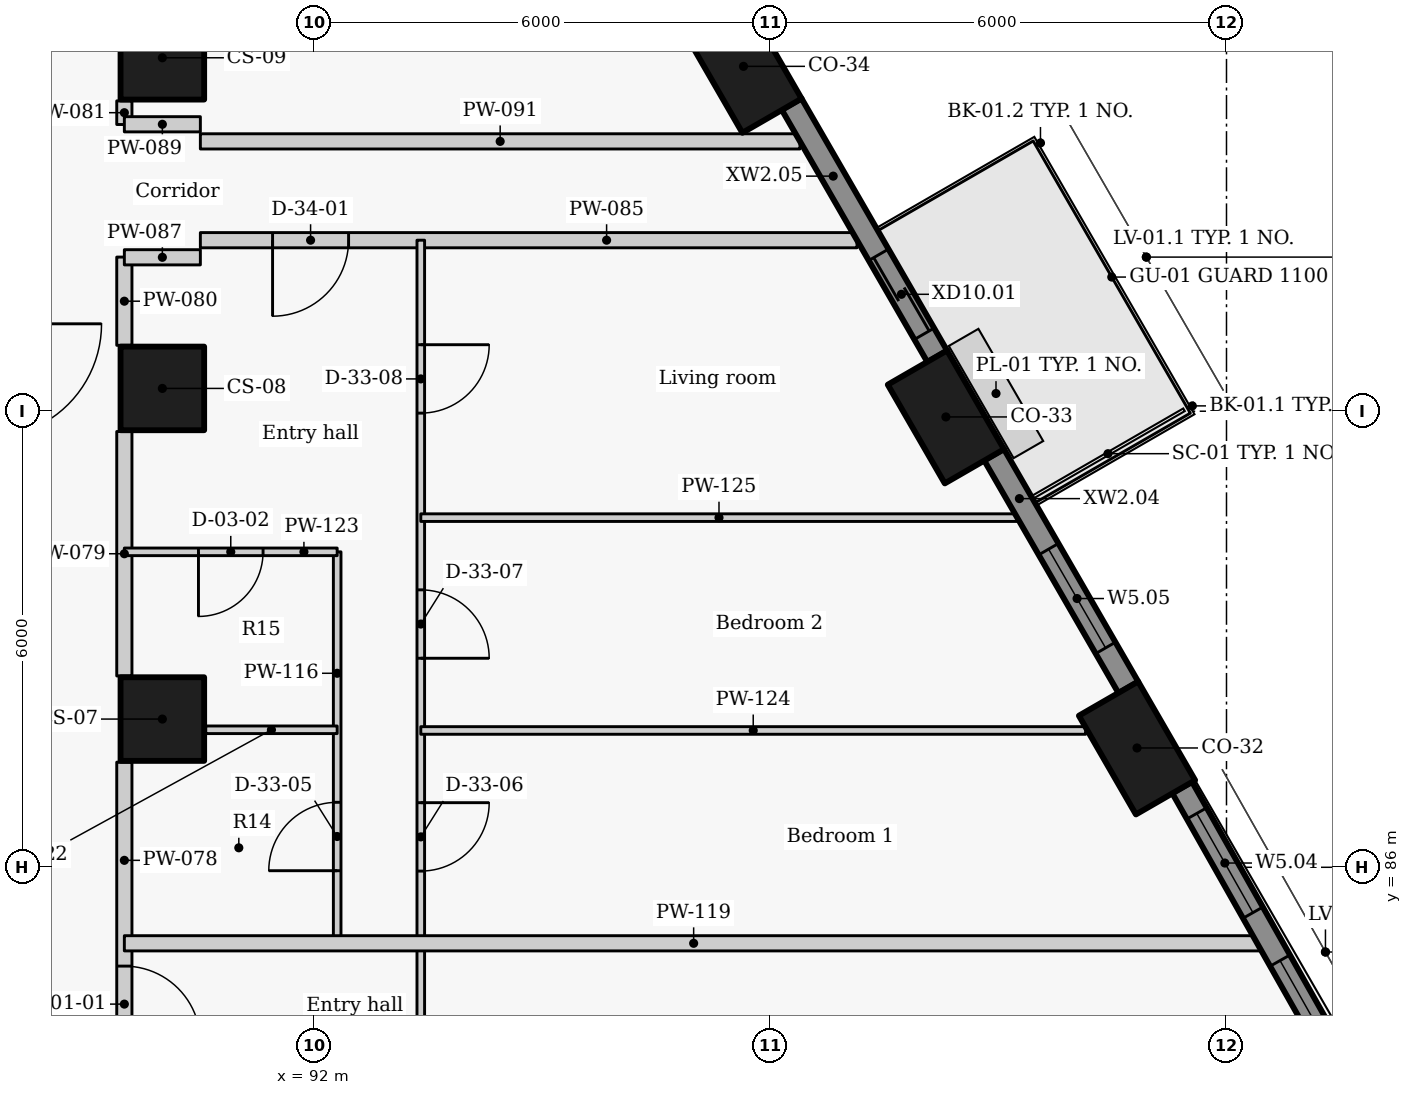
"""IFC4 building model, lengths in metres.
Left out: names, types, materials, properties, quantities, classifications, styles, units other than length and angle.
Written with IfcOpenShell. Run it as: python <this file> out.ifc"""

import sys

from ifc_helpers import new_model, si_unit, direction, frame, frame_2d, origin, origin_2d, place, context, subcontext, project, spatial, rectangle, extrude, element, fill, save


model = new_model("IFC4")
c1 = context("Model", 3, precision=1e-05, world=origin(), true_north=direction((0.0, 1.0)))
c2 = subcontext(c1, "Body", "Model", "MODEL_VIEW")
j1 = project(units=[si_unit("LENGTHUNIT", "METRE"), si_unit("PLANEANGLEUNIT", "RADIAN")], contexts=[c1])
p1 = place(None, origin())
s1 = spatial("IfcSite", under=j1, at=p1, CompositionType="ELEMENT")
p2 = place(p1, origin())
s2 = spatial("IfcBuilding", under=s1, at=p2, CompositionType="ELEMENT")
p3 = place(p2, frame((0.0, 0.0, 67.8)))
s3 = spatial("IfcBuildingStorey", under=s2, at=p3, CompositionType="ELEMENT", Elevation=67.8)
for number, where, z_axis, x_axis in (
    (1, (102.823, 87.57, 0.0), (0.0, 0.0, 1.0), (-0.5, 0.866, 0.0)),
    (2, (100.308, 91.925, 0.0), (0.0, 0.0, 1.0), (-0.5, 0.866, 0.0)),
    (3, (97.646, 96.537, 0.0), (0.0, 0.0, 1.0), (-0.5, 0.866, 0.0)),
):
    element("IfcColumn", number, at=place(p3, frame(where, z_axis=z_axis, x_axis=x_axis)), inside=s3, PredefinedType="COLUMN", context=c2, shape_type="SweptSolid", body=[
        extrude(rectangle(XDim=1.5, YDim=0.9, at=origin_2d()), origin(), (0.0, 0.0, 1.0), 3.3),
    ])
for number, where, z_axis, x_axis in (
    (4, (90.0, 87.95, 0.0), (0.0, 0.0, 1.0), (0.0, 1.0, 0.0)),
    (5, (90.0, 92.3, 0.0), (0.0, 0.0, 1.0), (0.0, 1.0, 0.0)),
    (6, (90.0, 96.65, 0.0), (0.0, 0.0, 1.0), (0.0, 1.0, 0.0)),
):
    element("IfcColumn", number, at=place(p3, frame(where, z_axis=z_axis, x_axis=x_axis)), inside=s3, PredefinedType="COLUMN", context=c2, shape_type="SweptSolid", body=[
        extrude(rectangle(XDim=1.1, YDim=1.1, at=origin_2d()), origin(), (0.0, 0.0, 1.0), 3.3),
    ])
p4 = place(p3, frame((106.186, 82.153, 0.0), z_axis=(0.0, 0.0, 1.0), x_axis=(-0.492363204642, 0.870389840655, 0.0)))
e7 = element("IfcWall", 7, at=p4, inside=s3, PredefinedType="SOLIDWALL", context=c2, shape_type="SweptSolid", body=[
    extrude(rectangle(XDim=5.626, YDim=0.3, at=frame_2d((2.813, 0.0))), origin(), (0.0, 0.0, 1.0), 2.05),
])
p5 = place(p4, frame((0.909, 0.0, 0.9)))
e8 = element("IfcOpeningElement", 8, at=p5, cuts=e7, PredefinedType="OPENING", context=c2, shape_type="SweptSolid", body=[
    extrude(rectangle(XDim=2.1, YDim=1.1, at=frame_2d((1.05, 0.55))), frame((0.0, 0.16, 0.0), z_axis=(0.0, -1.0, 0.0), x_axis=(1.0, 0.0, 0.0)), (0.0, 0.0, 1.0), 0.32),
])
p6 = place(p4, frame((3.734, 0.0, 0.9)))
e9 = element("IfcOpeningElement", 9, at=p6, cuts=e7, PredefinedType="OPENING", context=c2, shape_type="SweptSolid", body=[
    extrude(rectangle(XDim=1.5, YDim=1.1, at=frame_2d((0.75, 0.55))), frame((0.0, 0.16, 0.0), z_axis=(0.0, -1.0, 0.0), x_axis=(1.0, 0.0, 0.0)), (0.0, 0.0, 1.0), 0.32),
])
p7 = place(p3, frame((102.71, 88.366, 0.0), z_axis=(0.0, 0.0, 1.0), x_axis=(-0.499977402622, 0.866038449993, 0.0)))
e10 = element("IfcWall", 10, at=p7, inside=s3, PredefinedType="SOLIDWALL", context=c2, shape_type="SweptSolid", body=[
    extrude(rectangle(XDim=3.537, YDim=0.3, at=frame_2d((1.769, 0.0))), origin(), (0.0, 0.0, 1.0), 2.05),
])
p8 = place(p7, frame((0.601, 0.0, 0.9)))
e11 = element("IfcOpeningElement", 11, at=p8, cuts=e10, PredefinedType="OPENING", context=c2, shape_type="SweptSolid", body=[
    extrude(rectangle(XDim=1.5, YDim=1.1, at=frame_2d((0.75, 0.55))), frame((0.0, 0.16, 0.0), z_axis=(0.0, -1.0, 0.0), x_axis=(1.0, 0.0, 0.0)), (0.0, 0.0, 1.0), 0.32),
])
p9 = place(p3, frame((100.195, 92.721, 0.0), z_axis=(0.0, 0.0, 1.0), x_axis=(-0.500001735503, 0.866024401789, 0.0)))
e12 = element("IfcWall", 12, at=p9, inside=s3, PredefinedType="SOLIDWALL", context=c2, shape_type="SweptSolid", body=[
    extrude(rectangle(XDim=3.834, YDim=0.3, at=frame_2d((1.917, 0.0))), origin(), (0.0, 0.0, 1.0), 2.05),
])
p10 = place(p9, frame((0.344, 0.0, 0.0)))
e13 = element("IfcOpeningElement", 13, at=p10, cuts=e12, PredefinedType="OPENING", context=c2, shape_type="SweptSolid", body=[
    extrude(rectangle(XDim=1.2, YDim=2.0, at=frame_2d((0.6, 1.0))), frame((0.0, 0.16, 0.0), z_axis=(0.0, -1.0, 0.0), x_axis=(1.0, 0.0, 0.0)), (0.0, 0.0, 1.0), 0.32),
])
p11 = place(p3, frame((89.5, 87.383, 0.0), z_axis=(0.0, 0.0, 1.0), x_axis=(0.0, -1.0, 0.0)))
e14 = element("IfcWall", 14, at=p11, inside=s3, PredefinedType="PARTITIONING", context=c2, shape_type="SweptSolid", body=[
    extrude(rectangle(XDim=3.986, YDim=0.2, at=frame_2d((1.993, 0.0))), origin(), (0.0, 0.0, 1.0), 2.95),
])
p12 = place(p11, frame((2.683, 0.0, 0.0)))
e15 = element("IfcOpeningElement", 15, at=p12, cuts=e14, PredefinedType="OPENING", context=c2, shape_type="SweptSolid", body=[
    extrude(rectangle(XDim=1.0, YDim=2.1, at=frame_2d((0.5, 1.05))), frame((0.0, 0.11, 0.0), z_axis=(0.0, -1.0, 0.0), x_axis=(1.0, 0.0, 0.0)), (0.0, 0.0, 1.0), 0.22),
])
p13 = place(p3, frame((89.5, 88.517, 0.0), z_axis=(0.0, 0.0, 1.0), x_axis=(0.0, 1.0, 0.0)))
e16 = element("IfcWall", 16, at=p13, inside=s3, PredefinedType="PARTITIONING", context=c2, shape_type="SweptSolid", body=[
    extrude(rectangle(XDim=3.216, YDim=0.2, at=frame_2d((1.608, 0.0))), origin(), (0.0, 0.0, 1.0), 2.95),
])
p14 = place(p3, frame((89.5, 92.867, 0.0), z_axis=(0.0, 0.0, 1.0), x_axis=(0.0, 1.0, 0.0)))
e17 = element("IfcWall", 17, at=p14, inside=s3, PredefinedType="PARTITIONING", context=c2, shape_type="SweptSolid", body=[
    extrude(rectangle(XDim=1.161, YDim=0.2, at=frame_2d((0.581, 0.0))), origin(), (0.0, 0.0, 1.0), 2.95),
])
p15 = place(p3, frame((89.5, 95.772, 0.0), z_axis=(0.0, 0.0, 1.0), x_axis=(0.0, 1.0, 0.0)))
e18 = element("IfcWall", 18, at=p15, inside=s3, PredefinedType="PARTITIONING", context=c2, shape_type="SweptSolid", body=[
    extrude(rectangle(XDim=0.311, YDim=0.2, at=frame_2d((0.156, 0.0))), origin(), (0.0, 0.0, 1.0), 2.95),
])
p16 = place(p3, frame((99.139, 94.25, 0.0), z_axis=(0.0, 0.0, 1.0), x_axis=(-1.0, 0.0, 0.0)))
e19 = element("IfcWall", 19, at=p16, inside=s3, PredefinedType="PARTITIONING", context=c2, shape_type="SweptSolid", body=[
    extrude(rectangle(XDim=8.639, YDim=0.2, at=frame_2d((4.32, 0.0))), origin(), (0.0, 0.0, 1.0), 2.03),
])
p17 = place(p16, frame((6.689, 0.0, 0.0)))
e20 = element("IfcOpeningElement", 20, at=p17, cuts=e19, PredefinedType="OPENING", context=c2, shape_type="SweptSolid", body=[
    extrude(rectangle(XDim=1.0, YDim=2.01, at=frame_2d((0.5, 1.005))), frame((0.0, 0.11, 0.0), z_axis=(0.0, -1.0, 0.0), x_axis=(1.0, 0.0, 0.0)), (0.0, 0.0, 1.0), 0.22),
])
for number, where, z_axis, x_axis in (
    (21, (89.5, 94.025, 0.0), (0.0, 0.0, 1.0), (1.0, 0.0, 0.0)),
    (22, (89.5, 95.775, 0.0), (0.0, 0.0, 1.0), (1.0, 0.0, 0.0)),
):
    element("IfcWall", number, at=place(p3, frame(where, z_axis=z_axis, x_axis=x_axis)), inside=s3, PredefinedType="PARTITIONING", context=c2, shape_type="SweptSolid", body=[
        extrude(rectangle(XDim=1.0, YDim=0.2, at=frame_2d((0.5, 0.0))), origin(), (0.0, 0.0, 1.0), 2.43),
    ])
p18 = place(p3, frame((90.5, 95.55, 0.0), z_axis=(0.0, 0.0, 1.0), x_axis=(1.0, 0.0, 0.0)))
e23 = element("IfcWall", 23, at=p18, inside=s3, PredefinedType="PARTITIONING", context=c2, shape_type="SweptSolid", body=[
    extrude(rectangle(XDim=7.889, YDim=0.2, at=frame_2d((3.944, 0.0))), origin(), (0.0, 0.0, 1.0), 2.03),
])
p19 = place(p3, frame((92.3, 85.0, 0.0), z_axis=(0.0, 0.0, 1.0), x_axis=(0.0, 1.0, 0.0)))
e24 = element("IfcWall", 24, at=p19, inside=s3, PredefinedType="PARTITIONING", context=c2, shape_type="SweptSolid", body=[
    extrude(rectangle(XDim=5.15, YDim=0.1, at=frame_2d((2.575, 0.0))), origin(), (0.0, 0.0, 1.0), 2.95),
])
p20 = place(p19, frame((0.955, 0.0, 0.0)))
e25 = element("IfcOpeningElement", 25, at=p20, cuts=e24, PredefinedType="OPENING", context=c2, shape_type="SweptSolid", body=[
    extrude(rectangle(XDim=0.9, YDim=2.1, at=frame_2d((0.45, 1.05))), frame((0.0, 0.06, 0.0), z_axis=(0.0, -1.0, 0.0), x_axis=(1.0, 0.0, 0.0)), (0.0, 0.0, 1.0), 0.12),
])
p21 = place(p3, frame((93.4, 94.25, 0.0), z_axis=(0.0, 0.0, 1.0), x_axis=(0.0, -1.0, 0.0)))
e26 = element("IfcWall", 26, at=p21, inside=s3, PredefinedType="PARTITIONING", context=c2, shape_type="SweptSolid", body=[
    extrude(rectangle(XDim=19.25, YDim=0.1, at=frame_2d((9.625, 0.0))), origin(), (0.0, 0.0, 1.0), 2.95),
])
p22 = place(p21, frame((17.348, 0.0, 0.0)))
e27 = element("IfcOpeningElement", 27, at=p22, cuts=e26, PredefinedType="OPENING", context=c2, shape_type="SweptSolid", body=[
    extrude(rectangle(XDim=0.9, YDim=2.1, at=frame_2d((0.45, 1.05))), frame((0.0, 0.06, 0.0), z_axis=(0.0, -1.0, 0.0), x_axis=(1.0, 0.0, 0.0)), (0.0, 0.0, 1.0), 0.12),
])
p23 = place(p21, frame((14.445, 0.0, 0.0)))
e28 = element("IfcOpeningElement", 28, at=p23, cuts=e26, PredefinedType="OPENING", context=c2, shape_type="SweptSolid", body=[
    extrude(rectangle(XDim=0.9, YDim=2.1, at=frame_2d((0.45, 1.05))), frame((0.0, 0.06, 0.0), z_axis=(0.0, -1.0, 0.0), x_axis=(1.0, 0.0, 0.0)), (0.0, 0.0, 1.0), 0.12),
])
p24 = place(p21, frame((10.897, 0.0, 0.0)))
e29 = element("IfcOpeningElement", 29, at=p24, cuts=e26, PredefinedType="OPENING", context=c2, shape_type="SweptSolid", body=[
    extrude(rectangle(XDim=0.9, YDim=2.1, at=frame_2d((0.45, 1.05))), frame((0.0, 0.06, 0.0), z_axis=(0.0, -1.0, 0.0), x_axis=(1.0, 0.0, 0.0)), (0.0, 0.0, 1.0), 0.12),
])
p25 = place(p21, frame((7.4, 0.0, 0.0)))
e30 = element("IfcOpeningElement", 30, at=p25, cuts=e26, PredefinedType="OPENING", context=c2, shape_type="SweptSolid", body=[
    extrude(rectangle(XDim=0.9, YDim=2.1, at=frame_2d((0.45, 1.05))), frame((0.0, 0.06, 0.0), z_axis=(0.0, -1.0, 0.0), x_axis=(1.0, 0.0, 0.0)), (0.0, 0.0, 1.0), 0.12),
])
p26 = place(p21, frame((4.6, 0.0, 0.0)))
e31 = element("IfcOpeningElement", 31, at=p26, cuts=e26, PredefinedType="OPENING", context=c2, shape_type="SweptSolid", body=[
    extrude(rectangle(XDim=0.9, YDim=2.1, at=frame_2d((0.45, 1.05))), frame((0.0, 0.06, 0.0), z_axis=(0.0, -1.0, 0.0), x_axis=(1.0, 0.0, 0.0)), (0.0, 0.0, 1.0), 0.12),
])
p27 = place(p21, frame((1.375, 0.0, 0.0)))
e32 = element("IfcOpeningElement", 32, at=p27, cuts=e26, PredefinedType="OPENING", context=c2, shape_type="SweptSolid", body=[
    extrude(rectangle(XDim=0.9, YDim=2.1, at=frame_2d((0.45, 1.05))), frame((0.0, 0.06, 0.0), z_axis=(0.0, -1.0, 0.0), x_axis=(1.0, 0.0, 0.0)), (0.0, 0.0, 1.0), 0.12),
])
p28 = place(p3, frame((89.5, 85.0, 0.0), z_axis=(0.0, 0.0, 1.0), x_axis=(1.0, 0.0, 0.0)))
e33 = element("IfcWall", 33, at=p28, inside=s3, PredefinedType="PARTITIONING", context=c2, shape_type="SweptSolid", body=[
    extrude(rectangle(XDim=14.979, YDim=0.2, at=frame_2d((7.49, 0.0))), origin(), (0.0, 0.0, 1.0), 2.03),
])
p29 = place(p3, frame((90.57, 87.809, 0.0), z_axis=(0.0, 0.0, 1.0), x_axis=(1.0, 0.0, 0.0)))
e34 = element("IfcWall", 34, at=p29, inside=s3, PredefinedType="PARTITIONING", context=c2, shape_type="SweptSolid", body=[
    extrude(rectangle(XDim=1.73, YDim=0.1, at=frame_2d((0.865, 0.0))), origin(), (0.0, 0.0, 1.0), 2.95),
])
p30 = place(p3, frame((92.3, 90.15, 0.0), z_axis=(0.0, 0.0, 1.0), x_axis=(-1.0, 0.0, 0.0)))
e35 = element("IfcWall", 35, at=p30, inside=s3, PredefinedType="PARTITIONING", context=c2, shape_type="SweptSolid", body=[
    extrude(rectangle(XDim=2.8, YDim=0.1, at=frame_2d((1.4, 0.0))), origin(), (0.0, 0.0, 1.0), 2.43),
])
p31 = place(p30, frame((0.975, 0.0, 0.0)))
e36 = element("IfcOpeningElement", 36, at=p31, cuts=e35, PredefinedType="OPENING", context=c2, shape_type="SweptSolid", body=[
    extrude(rectangle(XDim=0.85, YDim=2.1, at=frame_2d((0.425, 1.05))), frame((0.0, 0.06, 0.0), z_axis=(0.0, -1.0, 0.0), x_axis=(1.0, 0.0, 0.0)), (0.0, 0.0, 1.0), 0.12),
])
p32 = place(p3, frame((93.4, 87.8, 0.0), z_axis=(0.0, 0.0, 1.0), x_axis=(1.0, 0.0, 0.0)))
e37 = element("IfcWall", 37, at=p32, inside=s3, PredefinedType="PARTITIONING", context=c2, shape_type="SweptSolid", body=[
    extrude(rectangle(XDim=8.747, YDim=0.1, at=frame_2d((4.374, 0.0))), origin(), (0.0, 0.0, 1.0), 2.95),
])
p33 = place(p3, frame((93.4, 90.6, 0.0), z_axis=(0.0, 0.0, 1.0), x_axis=(1.0, 0.0, 0.0)))
e38 = element("IfcWall", 38, at=p33, inside=s3, PredefinedType="PARTITIONING", context=c2, shape_type="SweptSolid", body=[
    extrude(rectangle(XDim=7.846, YDim=0.1, at=frame_2d((3.923, 0.0))), origin(), (0.0, 0.0, 1.0), 2.03),
])
p34 = place(p5, origin())
e39 = element("IfcWindow", 39, at=p34, inside=s3, PartitioningType="SINGLE_PANEL", PredefinedType="WINDOW", context=c2, shape_type="SweptSolid", body=[
    extrude(rectangle(XDim=2.1, YDim=1.1, at=frame_2d((1.05, 0.55))), frame((0.0, 0.03, 0.0), z_axis=(0.0, -1.0, 0.0), x_axis=(1.0, 0.0, 0.0)), (0.0, 0.0, 1.0), 0.06),
])
fill(e8, e39)
p35 = place(p6, origin())
e40 = element("IfcWindow", 40, at=p35, inside=s3, PartitioningType="SINGLE_PANEL", PredefinedType="WINDOW", context=c2, shape_type="SweptSolid", body=[
    extrude(rectangle(XDim=1.5, YDim=1.1, at=frame_2d((0.75, 0.55))), frame((0.0, 0.03, 0.0), z_axis=(0.0, -1.0, 0.0), x_axis=(1.0, 0.0, 0.0)), (0.0, 0.0, 1.0), 0.06),
])
fill(e9, e40)
p36 = place(p8, origin())
e41 = element("IfcWindow", 41, at=p36, inside=s3, PartitioningType="SINGLE_PANEL", PredefinedType="WINDOW", context=c2, shape_type="SweptSolid", body=[
    extrude(rectangle(XDim=1.5, YDim=1.1, at=frame_2d((0.75, 0.55))), frame((0.0, 0.03, 0.0), z_axis=(0.0, -1.0, 0.0), x_axis=(1.0, 0.0, 0.0)), (0.0, 0.0, 1.0), 0.06),
])
fill(e11, e41)
p37 = place(p10, origin())
e42 = element("IfcDoor", 42, at=p37, inside=s3, OperationType="SLIDING_TO_LEFT", PredefinedType="DOOR", context=c2, shape_type="SweptSolid", body=[
    extrude(rectangle(XDim=1.2, YDim=2.0, at=frame_2d((0.6, 1.0))), frame((0.0, 0.025, 0.0), z_axis=(0.0, -1.0, 0.0), x_axis=(1.0, 0.0, 0.0)), (0.0, 0.0, 1.0), 0.05),
])
fill(e13, e42)
p38 = place(p12, origin())
e43 = element("IfcDoor", 43, at=p38, inside=s3, OperationType="SINGLE_SWING_RIGHT", PredefinedType="DOOR", context=c2, shape_type="SweptSolid", body=[
    extrude(rectangle(XDim=1.0, YDim=2.1, at=frame_2d((0.5, 1.05))), frame((0.0, 0.025, 0.0), z_axis=(0.0, -1.0, 0.0), x_axis=(1.0, 0.0, 0.0)), (0.0, 0.0, 1.0), 0.05),
])
fill(e15, e43)
p39 = place(p17, origin())
e44 = element("IfcDoor", 44, at=p39, inside=s3, OperationType="SINGLE_SWING_RIGHT", PredefinedType="DOOR", context=c2, shape_type="SweptSolid", body=[
    extrude(rectangle(XDim=1.0, YDim=2.01, at=frame_2d((0.5, 1.005))), frame((0.0, 0.025, 0.0), z_axis=(0.0, -1.0, 0.0), x_axis=(1.0, 0.0, 0.0)), (0.0, 0.0, 1.0), 0.05),
])
fill(e20, e44)
p40 = place(p20, origin())
e45 = element("IfcDoor", 45, at=p40, inside=s3, OperationType="SINGLE_SWING_LEFT", PredefinedType="DOOR", context=c2, shape_type="SweptSolid", body=[
    extrude(rectangle(XDim=0.9, YDim=2.1, at=frame_2d((0.45, 1.05))), frame((0.0, 0.025, 0.0), z_axis=(0.0, -1.0, 0.0), x_axis=(1.0, 0.0, 0.0)), (0.0, 0.0, 1.0), 0.05),
])
fill(e25, e45)
p41 = place(p31, origin())
e46 = element("IfcDoor", 46, at=p41, inside=s3, OperationType="SINGLE_SWING_RIGHT", PredefinedType="DOOR", context=c2, shape_type="SweptSolid", body=[
    extrude(rectangle(XDim=0.85, YDim=2.1, at=frame_2d((0.425, 1.05))), frame((0.0, 0.025, 0.0), z_axis=(0.0, -1.0, 0.0), x_axis=(1.0, 0.0, 0.0)), (0.0, 0.0, 1.0), 0.05),
])
fill(e36, e46)
p42 = place(p25, origin())
e47 = element("IfcDoor", 47, at=p42, inside=s3, OperationType="SINGLE_SWING_LEFT", PredefinedType="DOOR", context=c2, shape_type="SweptSolid", body=[
    extrude(rectangle(XDim=0.9, YDim=2.1, at=frame_2d((0.45, 1.05))), frame((0.0, 0.025, 0.0), z_axis=(0.0, -1.0, 0.0), x_axis=(1.0, 0.0, 0.0)), (0.0, 0.0, 1.0), 0.05),
])
fill(e30, e47)
p43 = place(p26, origin())
e48 = element("IfcDoor", 48, at=p43, inside=s3, OperationType="SINGLE_SWING_RIGHT", PredefinedType="DOOR", context=c2, shape_type="SweptSolid", body=[
    extrude(rectangle(XDim=0.9, YDim=2.1, at=frame_2d((0.45, 1.05))), frame((0.0, 0.025, 0.0), z_axis=(0.0, -1.0, 0.0), x_axis=(1.0, 0.0, 0.0)), (0.0, 0.0, 1.0), 0.05),
])
fill(e31, e48)
p44 = place(p27, origin())
e49 = element("IfcDoor", 49, at=p44, inside=s3, OperationType="SINGLE_SWING_LEFT", PredefinedType="DOOR", context=c2, shape_type="SweptSolid", body=[
    extrude(rectangle(XDim=0.9, YDim=2.1, at=frame_2d((0.45, 1.05))), frame((0.0, 0.025, 0.0), z_axis=(0.0, -1.0, 0.0), x_axis=(1.0, 0.0, 0.0)), (0.0, 0.0, 1.0), 0.05),
])
fill(e32, e49)
save(model, sys.argv[1])
